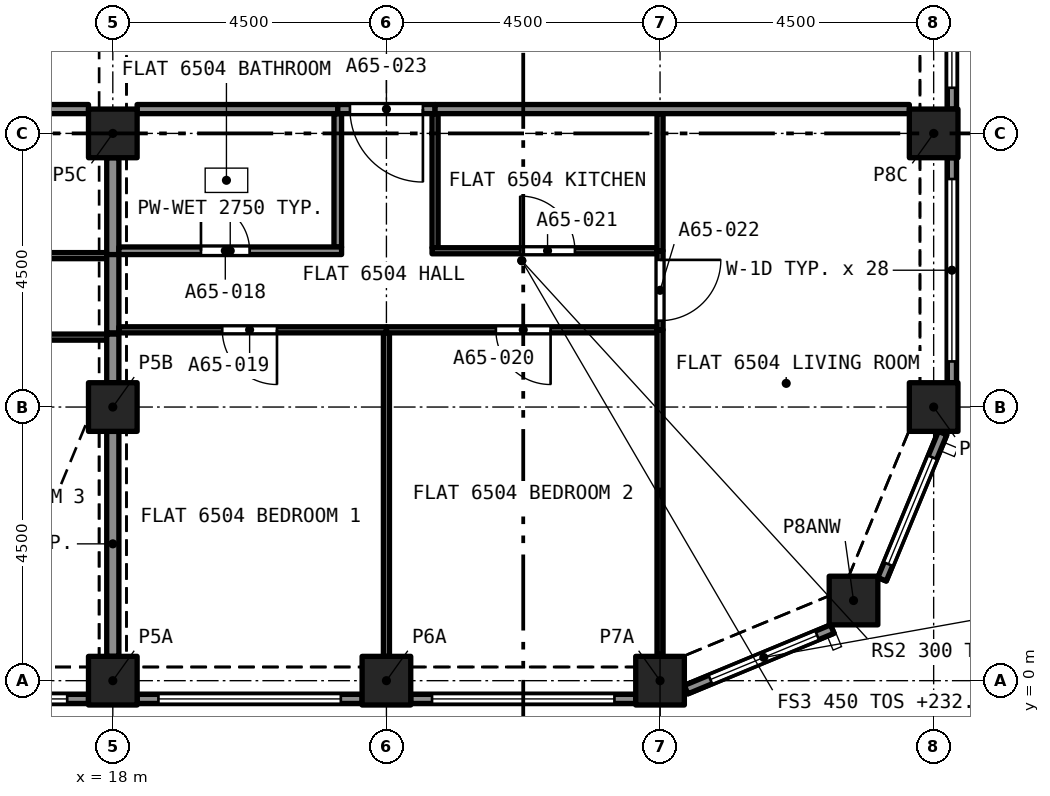
"""IFC4 building model, lengths in metres.
Left out: names, types, materials, properties, quantities, classifications, styles, units other than length and angle.
Written with IfcOpenShell. Run it as: python <this file> out.ifc"""

import sys

from ifc_helpers import new_model, si_unit, direction, frame, frame_2d, origin, origin_2d, place, context, subcontext, project, spatial, rectangle, extrude, element, fill, save


model = new_model("IFC4")
c1 = context("Model", 3, precision=1e-05, world=origin(), true_north=direction((0.0, 1.0)))
c2 = subcontext(c1, "Body", "Model", "MODEL_VIEW")
j1 = project(units=[si_unit("LENGTHUNIT", "METRE"), si_unit("PLANEANGLEUNIT", "RADIAN")], contexts=[c1])
p1 = place(None, origin())
s1 = spatial("IfcSite", under=j1, at=p1, CompositionType="ELEMENT")
p2 = place(p1, origin())
s2 = spatial("IfcBuilding", under=s1, at=p2, CompositionType="ELEMENT")
p3 = place(p2, frame((0.0, 0.0, 232.495)))
s3 = spatial("IfcBuildingStorey", under=s2, at=p3, CompositionType="ELEMENT", Elevation=232.495)
for number, where, z_axis, x_axis in (
    (1, (18.0, 0.0, 0.0), (0.0, 0.0, 1.0), (1.0, 0.0, 0.0)),
    (2, (22.5, 0.0, 0.0), (0.0, 0.0, 1.0), (1.0, 0.0, 0.0)),
    (3, (27.0, 0.0, 0.0), (0.0, 0.0, 1.0), (1.0, 0.0, 0.0)),
    (4, (30.182, 1.318, 0.0), (0.0, 0.0, 1.0), (1.0, 0.0, 0.0)),
    (5, (18.0, 4.5, 0.0), (0.0, 0.0, 1.0), (1.0, 0.0, 0.0)),
    (6, (31.5, 4.5, 0.0), (0.0, 0.0, 1.0), (1.0, 0.0, 0.0)),
    (7, (18.0, 9.0, 0.0), (0.0, 0.0, 1.0), (1.0, 0.0, 0.0)),
    (8, (31.5, 9.0, 0.0), (0.0, 0.0, 1.0), (1.0, 0.0, 0.0)),
):
    element("IfcColumn", number, at=place(p3, frame(where, z_axis=z_axis, x_axis=x_axis)), inside=s3, PredefinedType="COLUMN", context=c2, shape_type="SweptSolid", body=[
        extrude(rectangle(XDim=0.8, YDim=0.8, at=origin_2d()), origin(), (0.0, 0.0, 1.0), 3.2),
    ])
p4 = place(p3, frame((29.833, 0.849, 0.0), z_axis=(0.0, 0.0, 1.0), x_axis=(-0.923885342263, -0.382669406082, 0.0)))
e9 = element("IfcWall", 9, at=p4, inside=s3, PredefinedType="SOLIDWALL", context=c2, shape_type="SweptSolid", body=[
    extrude(rectangle(XDim=2.602, YDim=0.15, at=frame_2d((1.301, 0.0))), origin(), (0.0, 0.0, 1.0), 3.2),
])
p5 = place(p4, frame((0.27, 0.0, 0.45)))
e10 = element("IfcOpeningElement", 10, at=p5, cuts=e9, PredefinedType="OPENING", context=c2, shape_type="SweptSolid", body=[
    extrude(rectangle(XDim=1.9, YDim=1.95, at=frame_2d((0.95, 0.975))), frame((0.0, 0.085, 0.0), z_axis=(0.0, -1.0, 0.0), x_axis=(1.0, 0.0, 0.0)), (0.0, 0.0, 1.0), 0.17),
])
p6 = place(p3, frame((31.647, 4.071, 0.0), z_axis=(0.0, 0.0, 1.0), x_axis=(-0.382669406082, -0.923885342263, 0.0)))
e11 = element("IfcWall", 11, at=p6, inside=s3, PredefinedType="SOLIDWALL", context=c2, shape_type="SweptSolid", body=[
    extrude(rectangle(XDim=2.602, YDim=0.15, at=frame_2d((1.301, 0.0))), origin(), (0.0, 0.0, 1.0), 3.2),
])
p7 = place(p6, frame((0.432, 0.0, 0.45)))
e12 = element("IfcOpeningElement", 12, at=p7, cuts=e11, PredefinedType="OPENING", context=c2, shape_type="SweptSolid", body=[
    extrude(rectangle(XDim=1.9, YDim=1.95, at=frame_2d((0.95, 0.975))), frame((0.0, 0.085, 0.0), z_axis=(0.0, -1.0, 0.0), x_axis=(1.0, 0.0, 0.0)), (0.0, 0.0, 1.0), 0.17),
])
p8 = place(p3, frame((31.8, 8.6, 0.0), z_axis=(0.0, 0.0, 1.0), x_axis=(0.0, -1.0, 0.0)))
e13 = element("IfcWall", 13, at=p8, inside=s3, PredefinedType="SOLIDWALL", context=c2, shape_type="SweptSolid", body=[
    extrude(rectangle(XDim=3.7, YDim=0.15, at=frame_2d((1.85, 0.0))), origin(), (0.0, 0.0, 1.0), 3.2),
])
p9 = place(p8, frame((0.35, 0.0, 0.45)))
e14 = element("IfcOpeningElement", 14, at=p9, cuts=e13, PredefinedType="OPENING", context=c2, shape_type="SweptSolid", body=[
    extrude(rectangle(XDim=3.0, YDim=1.95, at=frame_2d((1.5, 0.975))), frame((0.0, 0.085, 0.0), z_axis=(0.0, -1.0, 0.0), x_axis=(1.0, 0.0, 0.0)), (0.0, 0.0, 1.0), 0.17),
])
p10 = place(p3, frame((31.8, 13.1, 0.0), z_axis=(0.0, 0.0, 1.0), x_axis=(0.0, -1.0, 0.0)))
e15 = element("IfcWall", 15, at=p10, inside=s3, PredefinedType="SOLIDWALL", context=c2, shape_type="SweptSolid", body=[
    extrude(rectangle(XDim=3.7, YDim=0.15, at=frame_2d((1.85, 0.0))), origin(), (0.0, 0.0, 1.0), 3.2),
])
p11 = place(p10, frame((0.35, 0.0, 0.45)))
e16 = element("IfcOpeningElement", 16, at=p11, cuts=e15, PredefinedType="OPENING", context=c2, shape_type="SweptSolid", body=[
    extrude(rectangle(XDim=3.0, YDim=1.95, at=frame_2d((1.5, 0.975))), frame((0.0, 0.085, 0.0), z_axis=(0.0, -1.0, 0.0), x_axis=(1.0, 0.0, 0.0)), (0.0, 0.0, 1.0), 0.17),
])
p12 = place(p3, frame((17.6, -0.3, 0.0), z_axis=(0.0, 0.0, 1.0), x_axis=(-1.0, 0.0, 0.0)))
e17 = element("IfcWall", 17, at=p12, inside=s3, PredefinedType="SOLIDWALL", context=c2, shape_type="SweptSolid", body=[
    extrude(rectangle(XDim=3.7, YDim=0.15, at=frame_2d((1.85, 0.0))), origin(), (0.0, 0.0, 1.0), 3.2),
])
p13 = place(p12, frame((0.35, 0.0, 0.45)))
e18 = element("IfcOpeningElement", 18, at=p13, cuts=e17, PredefinedType="OPENING", context=c2, shape_type="SweptSolid", body=[
    extrude(rectangle(XDim=3.0, YDim=1.95, at=frame_2d((1.5, 0.975))), frame((0.0, 0.085, 0.0), z_axis=(0.0, -1.0, 0.0), x_axis=(1.0, 0.0, 0.0)), (0.0, 0.0, 1.0), 0.17),
])
p14 = place(p3, frame((22.1, -0.3, 0.0), z_axis=(0.0, 0.0, 1.0), x_axis=(-1.0, 0.0, 0.0)))
e19 = element("IfcWall", 19, at=p14, inside=s3, PredefinedType="SOLIDWALL", context=c2, shape_type="SweptSolid", body=[
    extrude(rectangle(XDim=3.7, YDim=0.15, at=frame_2d((1.85, 0.0))), origin(), (0.0, 0.0, 1.0), 3.2),
])
p15 = place(p14, frame((0.35, 0.0, 0.45)))
e20 = element("IfcOpeningElement", 20, at=p15, cuts=e19, PredefinedType="OPENING", context=c2, shape_type="SweptSolid", body=[
    extrude(rectangle(XDim=3.0, YDim=1.95, at=frame_2d((1.5, 0.975))), frame((0.0, 0.085, 0.0), z_axis=(0.0, -1.0, 0.0), x_axis=(1.0, 0.0, 0.0)), (0.0, 0.0, 1.0), 0.17),
])
p16 = place(p3, frame((26.6, -0.3, 0.0), z_axis=(0.0, 0.0, 1.0), x_axis=(-1.0, 0.0, 0.0)))
e21 = element("IfcWall", 21, at=p16, inside=s3, PredefinedType="SOLIDWALL", context=c2, shape_type="SweptSolid", body=[
    extrude(rectangle(XDim=3.7, YDim=0.15, at=frame_2d((1.85, 0.0))), origin(), (0.0, 0.0, 1.0), 3.2),
])
p17 = place(p16, frame((0.35, 0.0, 0.45)))
e22 = element("IfcOpeningElement", 22, at=p17, cuts=e21, PredefinedType="OPENING", context=c2, shape_type="SweptSolid", body=[
    extrude(rectangle(XDim=3.0, YDim=1.95, at=frame_2d((1.5, 0.975))), frame((0.0, 0.085, 0.0), z_axis=(0.0, -1.0, 0.0), x_axis=(1.0, 0.0, 0.0)), (0.0, 0.0, 1.0), 0.17),
])
for number, where, z_axis, x_axis in (
    (23, (29.833, 0.849, 3.2), (0.0, 0.0, 1.0), (-0.924, -0.383, 0.0)),
    (24, (31.647, 4.071, 3.2), (0.0, 0.0, 1.0), (-0.383, -0.924, 0.0)),
):
    element("IfcWall", number, at=place(p3, frame(where, z_axis=z_axis, x_axis=x_axis)), inside=s3, PredefinedType="PARAPET", context=c2, shape_type="SweptSolid", body=[
        extrude(rectangle(XDim=2.602, YDim=0.15, at=frame_2d((1.301, 0.0))), origin(), (0.0, 0.0, 1.0), 1.1),
    ])
for number, where, z_axis, x_axis in (
    (25, (31.8, 8.6, 3.2), (0.0, 0.0, 1.0), (0.0, -1.0, 0.0)),
    (26, (31.8, 13.1, 3.2), (0.0, 0.0, 1.0), (0.0, -1.0, 0.0)),
    (27, (17.6, -0.3, 3.2), (0.0, 0.0, 1.0), (-1.0, 0.0, 0.0)),
    (28, (22.1, -0.3, 3.2), (0.0, 0.0, 1.0), (-1.0, 0.0, 0.0)),
    (29, (26.6, -0.3, 3.2), (0.0, 0.0, 1.0), (-1.0, 0.0, 0.0)),
):
    element("IfcWall", number, at=place(p3, frame(where, z_axis=z_axis, x_axis=x_axis)), inside=s3, PredefinedType="PARAPET", context=c2, shape_type="SweptSolid", body=[
        extrude(rectangle(XDim=3.7, YDim=0.15, at=frame_2d((1.85, 0.0))), origin(), (0.0, 0.0, 1.0), 1.1),
    ])
p18 = place(p3, frame((17.9, 5.65, 0.0), z_axis=(0.0, 0.0, 1.0), x_axis=(-1.0, 0.0, 0.0)))
e30 = element("IfcWall", 30, at=p18, inside=s3, PredefinedType="PARTITIONING", context=c2, shape_type="SweptSolid", body=[
    extrude(rectangle(XDim=4.4, YDim=0.1, at=frame_2d((2.2, 0.0))), origin(), (0.0, 0.0, 1.0), 2.85),
])
p19 = place(p18, frame((1.7, 0.0, 0.0)))
e31 = element("IfcOpeningElement", 31, at=p19, cuts=e30, PredefinedType="OPENING", context=c2, shape_type="SweptSolid", body=[
    extrude(rectangle(XDim=0.9, YDim=2.1, at=frame_2d((0.45, 1.05))), frame((0.0, 0.06, 0.0), z_axis=(0.0, -1.0, 0.0), x_axis=(1.0, 0.0, 0.0)), (0.0, 0.0, 1.0), 0.12),
])
p20 = place(p3, frame((18.0, 4.9, 0.0), z_axis=(0.0, 0.0, 1.0), x_axis=(0.0, 1.0, 0.0)))
e32 = element("IfcWall", 32, at=p20, inside=s3, PredefinedType="PARTITIONING", context=c2, shape_type="SweptSolid", body=[
    extrude(rectangle(XDim=0.8, YDim=0.2, at=frame_2d((0.4, 0.0))), origin(), (0.0, 0.0, 1.0), 2.38),
])
p21 = place(p3, frame((18.0, 0.4, 0.0), z_axis=(0.0, 0.0, 1.0), x_axis=(0.0, 1.0, 0.0)))
e33 = element("IfcWall", 33, at=p21, inside=s3, PredefinedType="PARTITIONING", context=c2, shape_type="SweptSolid", body=[
    extrude(rectangle(XDim=3.7, YDim=0.2, at=frame_2d((1.85, 0.0))), origin(), (0.0, 0.0, 1.0), 2.38),
])
p22 = place(p3, frame((12.0, 6.99, 0.0), z_axis=(0.0, 0.0, 1.0), x_axis=(1.0, 0.0, 0.0)))
e34 = element("IfcWall", 34, at=p22, inside=s3, PredefinedType="PARTITIONING", context=c2, shape_type="SweptSolid", body=[
    extrude(rectangle(XDim=5.9, YDim=0.1, at=frame_2d((2.95, 0.0))), origin(), (0.0, 0.0, 1.0), 2.85),
])
p23 = place(p22, frame((2.575, 0.0, 0.0)))
e35 = element("IfcOpeningElement", 35, at=p23, cuts=e34, PredefinedType="OPENING", context=c2, shape_type="SweptSolid", body=[
    extrude(rectangle(XDim=0.9, YDim=2.1, at=frame_2d((0.45, 1.05))), frame((0.0, 0.06, 0.0), z_axis=(0.0, -1.0, 0.0), x_axis=(1.0, 0.0, 0.0)), (0.0, 0.0, 1.0), 0.12),
])
p24 = place(p3, frame((18.0, 5.72, 0.0), z_axis=(0.0, 0.0, 1.0), x_axis=(0.0, 1.0, 0.0)))
e36 = element("IfcWall", 36, at=p24, inside=s3, PredefinedType="PARTITIONING", context=c2, shape_type="SweptSolid", body=[
    extrude(rectangle(XDim=1.32, YDim=0.2, at=frame_2d((0.66, 0.0))), origin(), (0.0, 0.0, 1.0), 2.38),
])
p25 = place(p3, frame((18.0, 7.008, 0.0), z_axis=(0.0, 0.0, 1.0), x_axis=(0.0, 1.0, 0.0)))
e37 = element("IfcWall", 37, at=p25, inside=s3, PredefinedType="PARTITIONING", context=c2, shape_type="SweptSolid", body=[
    extrude(rectangle(XDim=1.593, YDim=0.2, at=frame_2d((0.796, 0.0))), origin(), (0.0, 0.0, 1.0), 2.38),
])
p26 = place(p3, frame((12.05, 9.4, 0.0), z_axis=(0.0, 0.0, 1.0), x_axis=(1.0, 0.0, 0.0)))
e38 = element("IfcWall", 38, at=p26, inside=s3, PredefinedType="PARTITIONING", context=c2, shape_type="SweptSolid", body=[
    extrude(rectangle(XDim=5.55, YDim=0.15, at=frame_2d((2.775, 0.0))), origin(), (0.0, 0.0, 1.0), 2.85),
])
p27 = place(p3, frame((21.7, 7.133, 0.0), z_axis=(0.0, 0.0, 1.0), x_axis=(0.0, 1.0, 0.0)))
e39 = element("IfcWall", 39, at=p27, inside=s3, PredefinedType="PARTITIONING", context=c2, shape_type="SweptSolid", body=[
    extrude(rectangle(XDim=2.192, YDim=0.125, at=frame_2d((1.096, 0.0))), origin(), (0.0, 0.0, 1.0), 2.75),
])
p28 = place(p3, frame((18.1, 7.07, 0.0), z_axis=(0.0, 0.0, 1.0), x_axis=(1.0, 0.0, 0.0)))
e40 = element("IfcWall", 40, at=p28, inside=s3, PredefinedType="PARTITIONING", context=c2, shape_type="SweptSolid", body=[
    extrude(rectangle(XDim=3.662, YDim=0.125, at=frame_2d((1.831, 0.0))), origin(), (0.0, 0.0, 1.0), 2.75),
])
p29 = place(p28, frame((1.35, 0.0, 0.0)))
e41 = element("IfcOpeningElement", 41, at=p29, cuts=e40, PredefinedType="OPENING", context=c2, shape_type="SweptSolid", body=[
    extrude(rectangle(XDim=0.8, YDim=2.1, at=frame_2d((0.4, 1.05))), frame((0.0, 0.073, 0.0), z_axis=(0.0, -1.0, 0.0), x_axis=(1.0, 0.0, 0.0)), (0.0, 0.0, 1.0), 0.145),
])
p30 = place(p3, frame((18.4, 9.4, 0.0), z_axis=(0.0, 0.0, 1.0), x_axis=(1.0, 0.0, 0.0)))
e42 = element("IfcWall", 42, at=p30, inside=s3, PredefinedType="PARTITIONING", context=c2, shape_type="SweptSolid", body=[
    extrude(rectangle(XDim=3.3, YDim=0.15, at=frame_2d((1.65, 0.0))), origin(), (0.0, 0.0, 1.0), 2.75),
])
p31 = place(p3, frame((22.5, 0.4, 0.0), z_axis=(0.0, 0.0, 1.0), x_axis=(0.0, 1.0, 0.0)))
e43 = element("IfcWall", 43, at=p31, inside=s3, PredefinedType="PARTITIONING", context=c2, shape_type="SweptSolid", body=[
    extrude(rectangle(XDim=5.32, YDim=0.1, at=frame_2d((2.66, 0.0))), origin(), (0.0, 0.0, 1.0), 2.75),
])
p32 = place(p3, frame((22.5, 5.77, 0.0), z_axis=(0.0, 0.0, 1.0), x_axis=(-1.0, 0.0, 0.0)))
e44 = element("IfcWall", 44, at=p32, inside=s3, PredefinedType="PARTITIONING", context=c2, shape_type="SweptSolid", body=[
    extrude(rectangle(XDim=4.4, YDim=0.1, at=frame_2d((2.2, 0.0))), origin(), (0.0, 0.0, 1.0), 2.75),
])
p33 = place(p32, frame((1.8, 0.0, 0.0)))
e45 = element("IfcOpeningElement", 45, at=p33, cuts=e44, PredefinedType="OPENING", context=c2, shape_type="SweptSolid", body=[
    extrude(rectangle(XDim=0.9, YDim=2.1, at=frame_2d((0.45, 1.05))), frame((0.0, 0.06, 0.0), z_axis=(0.0, -1.0, 0.0), x_axis=(1.0, 0.0, 0.0)), (0.0, 0.0, 1.0), 0.12),
])
p34 = place(p3, frame((26.95, 5.77, 0.0), z_axis=(0.0, 0.0, 1.0), x_axis=(-1.0, 0.0, 0.0)))
e46 = element("IfcWall", 46, at=p34, inside=s3, PredefinedType="PARTITIONING", context=c2, shape_type="SweptSolid", body=[
    extrude(rectangle(XDim=4.45, YDim=0.1, at=frame_2d((2.225, 0.0))), origin(), (0.0, 0.0, 1.0), 2.75),
])
p35 = place(p34, frame((1.75, 0.0, 0.0)))
e47 = element("IfcOpeningElement", 47, at=p35, cuts=e46, PredefinedType="OPENING", context=c2, shape_type="SweptSolid", body=[
    extrude(rectangle(XDim=0.9, YDim=2.1, at=frame_2d((0.45, 1.05))), frame((0.0, 0.06, 0.0), z_axis=(0.0, -1.0, 0.0), x_axis=(1.0, 0.0, 0.0)), (0.0, 0.0, 1.0), 0.12),
])
p36 = place(p3, frame((27.0, 0.433, 0.0), z_axis=(0.0, 0.0, 1.0), x_axis=(0.0, 1.0, 0.0)))
e48 = element("IfcWall", 48, at=p36, inside=s3, PredefinedType="PARTITIONING", context=c2, shape_type="SweptSolid", body=[
    extrude(rectangle(XDim=5.337, YDim=0.1, at=frame_2d((2.668, 0.0))), origin(), (0.0, 0.0, 1.0), 2.75),
])
p37 = place(p3, frame((23.3, 7.12, 0.0), z_axis=(0.0, 0.0, 1.0), x_axis=(0.0, 1.0, 0.0)))
e49 = element("IfcWall", 49, at=p37, inside=s3, PredefinedType="PARTITIONING", context=c2, shape_type="SweptSolid", body=[
    extrude(rectangle(XDim=2.205, YDim=0.1, at=frame_2d((1.103, 0.0))), origin(), (0.0, 0.0, 1.0), 2.75),
])
p38 = place(p3, frame((23.25, 7.07, 0.0), z_axis=(0.0, 0.0, 1.0), x_axis=(1.0, 0.0, 0.0)))
e50 = element("IfcWall", 50, at=p38, inside=s3, PredefinedType="PARTITIONING", context=c2, shape_type="SweptSolid", body=[
    extrude(rectangle(XDim=3.7, YDim=0.1, at=frame_2d((1.85, 0.0))), origin(), (0.0, 0.0, 1.0), 2.75),
])
p39 = place(p38, frame((1.45, 0.0, 0.0)))
e51 = element("IfcOpeningElement", 51, at=p39, cuts=e50, PredefinedType="OPENING", context=c2, shape_type="SweptSolid", body=[
    extrude(rectangle(XDim=0.9, YDim=2.1, at=frame_2d((0.45, 1.05))), frame((0.0, 0.06, 0.0), z_axis=(0.0, -1.0, 0.0), x_axis=(1.0, 0.0, 0.0)), (0.0, 0.0, 1.0), 0.12),
])
p40 = place(p3, frame((27.0, 7.07, 0.0), z_axis=(0.0, 0.0, 1.0), x_axis=(0.0, -1.0, 0.0)))
e52 = element("IfcWall", 52, at=p40, inside=s3, PredefinedType="PARTITIONING", context=c2, shape_type="SweptSolid", body=[
    extrude(rectangle(XDim=1.3, YDim=0.1, at=frame_2d((0.65, 0.0))), origin(), (0.0, 0.0, 1.0), 2.75),
])
p41 = place(p40, frame((0.15, 0.0, 0.0)))
e53 = element("IfcOpeningElement", 53, at=p41, cuts=e52, PredefinedType="OPENING", context=c2, shape_type="SweptSolid", body=[
    extrude(rectangle(XDim=1.0, YDim=2.1, at=frame_2d((0.5, 1.05))), frame((0.0, 0.06, 0.0), z_axis=(0.0, -1.0, 0.0), x_axis=(1.0, 0.0, 0.0)), (0.0, 0.0, 1.0), 0.12),
])
p42 = place(p3, frame((23.3, 9.4, 0.0), z_axis=(0.0, 0.0, 1.0), x_axis=(-1.0, 0.0, 0.0)))
e54 = element("IfcWall", 54, at=p42, inside=s3, PredefinedType="PARTITIONING", context=c2, shape_type="SweptSolid", body=[
    extrude(rectangle(XDim=1.6, YDim=0.15, at=frame_2d((0.8, 0.0))), origin(), (0.0, 0.0, 1.0), 2.75),
])
p43 = place(p42, frame((0.2, 0.0, 0.0)))
e55 = element("IfcOpeningElement", 55, at=p43, cuts=e54, PredefinedType="OPENING", context=c2, shape_type="SweptSolid", body=[
    extrude(rectangle(XDim=1.2, YDim=2.4, at=frame_2d((0.6, 1.2))), frame((0.0, 0.085, 0.0), z_axis=(0.0, -1.0, 0.0), x_axis=(1.0, 0.0, 0.0)), (0.0, 0.0, 1.0), 0.17),
])
p44 = place(p3, frame((27.0, 7.07, 0.0), z_axis=(0.0, 0.0, 1.0), x_axis=(0.0, 1.0, 0.0)))
e56 = element("IfcWall", 56, at=p44, inside=s3, PredefinedType="PARTITIONING", context=c2, shape_type="SweptSolid", body=[
    extrude(rectangle(XDim=2.255, YDim=0.1, at=frame_2d((1.127, 0.0))), origin(), (0.0, 0.0, 1.0), 2.75),
])
p45 = place(p3, frame((23.3, 9.4, 0.0), z_axis=(0.0, 0.0, 1.0), x_axis=(1.0, 0.0, 0.0)))
e57 = element("IfcWall", 57, at=p45, inside=s3, PredefinedType="PARTITIONING", context=c2, shape_type="SweptSolid", body=[
    extrude(rectangle(XDim=7.8, YDim=0.15, at=frame_2d((3.9, 0.0))), origin(), (0.0, 0.0, 1.0), 2.75),
])
p46 = place(p5, origin())
e58 = element("IfcWindow", 58, at=p46, inside=s3, PartitioningType="SINGLE_PANEL", PredefinedType="WINDOW", context=c2, shape_type="SweptSolid", body=[
    extrude(rectangle(XDim=1.9, YDim=1.95, at=frame_2d((0.95, 0.975))), frame((0.0, 0.03, 0.0), z_axis=(0.0, -1.0, 0.0), x_axis=(1.0, 0.0, 0.0)), (0.0, 0.0, 1.0), 0.06),
])
fill(e10, e58)
p47 = place(p7, origin())
e59 = element("IfcWindow", 59, at=p47, inside=s3, PartitioningType="SINGLE_PANEL", PredefinedType="WINDOW", context=c2, shape_type="SweptSolid", body=[
    extrude(rectangle(XDim=1.9, YDim=1.95, at=frame_2d((0.95, 0.975))), frame((0.0, 0.03, 0.0), z_axis=(0.0, -1.0, 0.0), x_axis=(1.0, 0.0, 0.0)), (0.0, 0.0, 1.0), 0.06),
])
fill(e12, e59)
p48 = place(p9, origin())
e60 = element("IfcWindow", 60, at=p48, inside=s3, PartitioningType="SINGLE_PANEL", PredefinedType="WINDOW", context=c2, shape_type="SweptSolid", body=[
    extrude(rectangle(XDim=3.0, YDim=1.95, at=frame_2d((1.5, 0.975))), frame((0.0, 0.03, 0.0), z_axis=(0.0, -1.0, 0.0), x_axis=(1.0, 0.0, 0.0)), (0.0, 0.0, 1.0), 0.06),
])
fill(e14, e60)
p49 = place(p11, origin())
e61 = element("IfcWindow", 61, at=p49, inside=s3, PartitioningType="SINGLE_PANEL", PredefinedType="WINDOW", context=c2, shape_type="SweptSolid", body=[
    extrude(rectangle(XDim=3.0, YDim=1.95, at=frame_2d((1.5, 0.975))), frame((0.0, 0.03, 0.0), z_axis=(0.0, -1.0, 0.0), x_axis=(1.0, 0.0, 0.0)), (0.0, 0.0, 1.0), 0.06),
])
fill(e16, e61)
p50 = place(p13, origin())
e62 = element("IfcWindow", 62, at=p50, inside=s3, PartitioningType="SINGLE_PANEL", PredefinedType="WINDOW", context=c2, shape_type="SweptSolid", body=[
    extrude(rectangle(XDim=3.0, YDim=1.95, at=frame_2d((1.5, 0.975))), frame((0.0, 0.03, 0.0), z_axis=(0.0, -1.0, 0.0), x_axis=(1.0, 0.0, 0.0)), (0.0, 0.0, 1.0), 0.06),
])
fill(e18, e62)
p51 = place(p15, origin())
e63 = element("IfcWindow", 63, at=p51, inside=s3, PartitioningType="SINGLE_PANEL", PredefinedType="WINDOW", context=c2, shape_type="SweptSolid", body=[
    extrude(rectangle(XDim=3.0, YDim=1.95, at=frame_2d((1.5, 0.975))), frame((0.0, 0.03, 0.0), z_axis=(0.0, -1.0, 0.0), x_axis=(1.0, 0.0, 0.0)), (0.0, 0.0, 1.0), 0.06),
])
fill(e20, e63)
p52 = place(p17, origin())
e64 = element("IfcWindow", 64, at=p52, inside=s3, PartitioningType="SINGLE_PANEL", PredefinedType="WINDOW", context=c2, shape_type="SweptSolid", body=[
    extrude(rectangle(XDim=3.0, YDim=1.95, at=frame_2d((1.5, 0.975))), frame((0.0, 0.03, 0.0), z_axis=(0.0, -1.0, 0.0), x_axis=(1.0, 0.0, 0.0)), (0.0, 0.0, 1.0), 0.06),
])
fill(e22, e64)
p53 = place(p29, origin())
e65 = element("IfcDoor", 65, at=p53, inside=s3, OperationType="SINGLE_SWING_LEFT", PredefinedType="DOOR", context=c2, shape_type="SweptSolid", body=[
    extrude(rectangle(XDim=0.8, YDim=2.1, at=frame_2d((0.4, 1.05))), frame((0.0, 0.025, 0.0), z_axis=(0.0, -1.0, 0.0), x_axis=(1.0, 0.0, 0.0)), (0.0, 0.0, 1.0), 0.05),
])
fill(e41, e65)
p54 = place(p33, origin())
e66 = element("IfcDoor", 66, at=p54, inside=s3, OperationType="SINGLE_SWING_RIGHT", PredefinedType="DOOR", context=c2, shape_type="SweptSolid", body=[
    extrude(rectangle(XDim=0.9, YDim=2.1, at=frame_2d((0.45, 1.05))), frame((0.0, 0.025, 0.0), z_axis=(0.0, -1.0, 0.0), x_axis=(1.0, 0.0, 0.0)), (0.0, 0.0, 1.0), 0.05),
])
fill(e45, e66)
p55 = place(p35, origin())
e67 = element("IfcDoor", 67, at=p55, inside=s3, OperationType="SINGLE_SWING_LEFT", PredefinedType="DOOR", context=c2, shape_type="SweptSolid", body=[
    extrude(rectangle(XDim=0.9, YDim=2.1, at=frame_2d((0.45, 1.05))), frame((0.0, 0.025, 0.0), z_axis=(0.0, -1.0, 0.0), x_axis=(1.0, 0.0, 0.0)), (0.0, 0.0, 1.0), 0.05),
])
fill(e47, e67)
p56 = place(p39, origin())
e68 = element("IfcDoor", 68, at=p56, inside=s3, OperationType="SINGLE_SWING_RIGHT", PredefinedType="DOOR", context=c2, shape_type="SweptSolid", body=[
    extrude(rectangle(XDim=0.9, YDim=2.1, at=frame_2d((0.45, 1.05))), frame((0.0, 0.025, 0.0), z_axis=(0.0, -1.0, 0.0), x_axis=(1.0, 0.0, 0.0)), (0.0, 0.0, 1.0), 0.05),
])
fill(e51, e68)
p57 = place(p41, origin())
e69 = element("IfcDoor", 69, at=p57, inside=s3, OperationType="SINGLE_SWING_LEFT", PredefinedType="DOOR", context=c2, shape_type="SweptSolid", body=[
    extrude(rectangle(XDim=1.0, YDim=2.1, at=frame_2d((0.5, 1.05))), frame((0.0, 0.025, 0.0), z_axis=(0.0, -1.0, 0.0), x_axis=(1.0, 0.0, 0.0)), (0.0, 0.0, 1.0), 0.05),
])
fill(e53, e69)
p58 = place(p43, origin())
e70 = element("IfcDoor", 70, at=p58, inside=s3, OperationType="SINGLE_SWING_LEFT", PredefinedType="DOOR", context=c2, shape_type="SweptSolid", body=[
    extrude(rectangle(XDim=1.2, YDim=2.4, at=frame_2d((0.6, 1.2))), frame((0.0, 0.025, 0.0), z_axis=(0.0, -1.0, 0.0), x_axis=(1.0, 0.0, 0.0)), (0.0, 0.0, 1.0), 0.05),
])
fill(e55, e70)
save(model, sys.argv[1])
